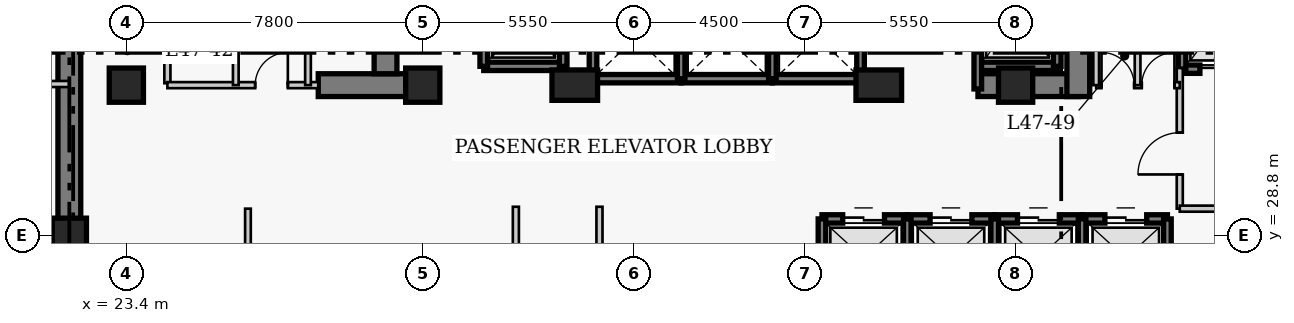
"""IFC4 building model, lengths in metres.
Left out: names, types, materials, properties, quantities, classifications, styles, units other than length and angle.
Written with IfcOpenShell. Run it as: python <this file> out.ifc"""

import sys

from ifc_helpers import new_model, si_unit, direction, frame, frame_2d, origin, origin_2d, place, context, subcontext, project, spatial, rectangle, extrude, element, fill, save


model = new_model("IFC4")
c1 = context("Model", 3, precision=1e-05, world=origin(), true_north=direction((0.0, 1.0)))
c2 = subcontext(c1, "Body", "Model", "MODEL_VIEW")
j1 = project(units=[si_unit("LENGTHUNIT", "METRE"), si_unit("PLANEANGLEUNIT", "RADIAN")], contexts=[c1])
p1 = place(None, origin())
s1 = spatial("IfcSite", under=j1, at=p1, CompositionType="ELEMENT")
p2 = place(p1, origin())
s2 = spatial("IfcBuilding", under=s1, at=p2, CompositionType="ELEMENT")
p3 = place(p2, frame((0.0, 0.0, 189.0)))
s3 = spatial("IfcBuildingStorey", under=s2, at=p3, CompositionType="ELEMENT", Elevation=189.0)
p4 = place(p3, frame((21.9, 27.05, 0.0), z_axis=(0.0, 0.0, 1.0), x_axis=(0.0, 1.0, 0.0)))
e1 = element("IfcWall", 1, at=p4, inside=s3, PredefinedType="SHEAR", context=c2, shape_type="SweptSolid", body=[
    extrude(rectangle(XDim=13.57, YDim=0.6, at=frame_2d((6.785, 0.0))), origin(), (0.0, 0.0, 1.0), 3.9),
])
p5 = place(p3, frame((28.45, 32.75, 0.0), z_axis=(0.0, 0.0, 1.0), x_axis=(1.0, 0.0, 0.0)))
e2 = element("IfcWall", 2, at=p5, inside=s3, PredefinedType="SHEAR", context=c2, shape_type="SweptSolid", body=[
    extrude(rectangle(XDim=2.4, YDim=0.6, at=frame_2d((1.2, 0.0))), origin(), (0.0, 0.0, 1.0), 3.9),
])
p6 = place(p3, frame((45.81, 32.75, 0.0), z_axis=(0.0, 0.0, 1.0), x_axis=(1.0, 0.0, 0.0)))
e3 = element("IfcWall", 3, at=p6, inside=s3, PredefinedType="SHEAR", context=c2, shape_type="SweptSolid", body=[
    extrude(rectangle(XDim=2.64, YDim=0.6, at=frame_2d((1.32, 0.0))), origin(), (0.0, 0.0, 1.0), 3.9),
])
p7 = place(p3, frame((30.22, 33.05, 0.0), z_axis=(0.0, 0.0, 1.0), x_axis=(0.0, 1.0, 0.0)))
e4 = element("IfcWall", 4, at=p7, inside=s3, PredefinedType="SHEAR", context=c2, shape_type="SweptSolid", body=[
    extrude(rectangle(XDim=7.27, YDim=0.6, at=frame_2d((3.635, 0.0))), origin(), (0.0, 0.0, 1.0), 3.9),
])
p8 = place(p3, frame((48.45, 32.45, 0.0), z_axis=(0.0, 0.0, 1.0), x_axis=(0.0, 1.0, 0.0)))
e5 = element("IfcWall", 5, at=p8, inside=s3, PredefinedType="SHEAR", context=c2, shape_type="SweptSolid", body=[
    extrude(rectangle(XDim=7.87, YDim=0.6, at=frame_2d((3.935, 0.0))), origin(), (0.0, 0.0, 1.0), 3.9),
])
p9 = place(p8, frame((5.75, 0.0, 0.0)))
e6 = element("IfcOpeningElement", 6, at=p9, cuts=e5, PredefinedType="OPENING", context=c2, shape_type="SweptSolid", body=[
    extrude(rectangle(XDim=1.1, YDim=2.15, at=frame_2d((0.55, 1.075))), frame((0.0, 0.31, 0.0), z_axis=(0.0, -1.0, 0.0), x_axis=(1.0, 0.0, 0.0)), (0.0, 0.0, 1.0), 0.62),
])
for number, where, z_axis, x_axis in (
    (7, (21.9, 28.8, 0.0), (0.0, 0.0, 1.0), (1.0, 0.0, 0.0)),
    (8, (23.4, 32.75, 0.0), (0.0, 0.0, 1.0), (1.0, 0.0, 0.0)),
    (9, (31.2, 32.75, 0.0), (0.0, 0.0, 1.0), (1.0, 0.0, 0.0)),
):
    element("IfcColumn", number, at=place(p3, frame(where, z_axis=z_axis, x_axis=x_axis)), inside=s3, PredefinedType="COLUMN", context=c2, shape_type="SweptSolid", body=[
        extrude(rectangle(XDim=0.9, YDim=0.9, at=origin_2d()), origin(), (0.0, 0.0, 1.0), 3.9),
    ])
for number, where, z_axis, x_axis in (
    (10, (35.2, 32.75, 0.0), (0.0, 0.0, 1.0), (1.0, 0.0, 0.0)),
    (11, (43.2, 32.75, 0.0), (0.0, 0.0, 1.0), (1.0, 0.0, 0.0)),
):
    element("IfcColumn", number, at=place(p3, frame(where, z_axis=z_axis, x_axis=x_axis)), inside=s3, PredefinedType="COLUMN", context=c2, shape_type="SweptSolid", body=[
        extrude(rectangle(XDim=1.2, YDim=0.8, at=origin_2d()), origin(), (0.0, 0.0, 1.0), 3.9),
    ])
p10 = place(p3, frame((46.8, 32.75, 0.0), z_axis=(0.0, 0.0, 1.0), x_axis=(1.0, 0.0, 0.0)))
e12 = element("IfcColumn", 12, at=p10, inside=s3, PredefinedType="COLUMN", context=c2, shape_type="SweptSolid", body=[
    extrude(rectangle(XDim=0.9, YDim=0.9, at=origin_2d()), origin(), (0.0, 0.0, 1.0), 3.9),
])
p11 = place(p3, frame((41.705, 29.23, 0.0), z_axis=(0.0, 0.0, 1.0), x_axis=(1.0, 0.0, 0.0)))
e13 = element("IfcWall", 13, at=p11, inside=s3, PredefinedType="SHEAR", context=c2, shape_type="SweptSolid", body=[
    extrude(rectangle(XDim=2.245, YDim=0.22, at=frame_2d((1.123, 0.0))), origin(), (0.0, 0.0, 1.0), 3.9),
])
p12 = place(p11, frame((0.545, 0.0, 0.0)))
e14 = element("IfcOpeningElement", 14, at=p12, cuts=e13, PredefinedType="OPENING", context=c2, shape_type="SweptSolid", body=[
    extrude(rectangle(XDim=1.1, YDim=2.15, at=frame_2d((0.55, 1.075))), frame((0.0, 0.12, 0.0), z_axis=(0.0, -1.0, 0.0), x_axis=(1.0, 0.0, 0.0)), (0.0, 0.0, 1.0), 0.24),
])
p13 = place(p3, frame((41.705, 27.17, 0.0), z_axis=(0.0, 0.0, 1.0), x_axis=(0.0, 1.0, 0.0)))
e15 = element("IfcWall", 15, at=p13, inside=s3, PredefinedType="SHEAR", context=c2, shape_type="SweptSolid", body=[
    extrude(rectangle(XDim=2.06, YDim=0.2, at=frame_2d((1.03, 0.0))), origin(), (0.0, 0.0, 1.0), 3.9),
])
p14 = place(p3, frame((43.95, 29.23, 0.0), z_axis=(0.0, 0.0, 1.0), x_axis=(1.0, 0.0, 0.0)))
e16 = element("IfcWall", 16, at=p14, inside=s3, PredefinedType="SHEAR", context=c2, shape_type="SweptSolid", body=[
    extrude(rectangle(XDim=2.3, YDim=0.22, at=frame_2d((1.15, 0.0))), origin(), (0.0, 0.0, 1.0), 3.9),
])
p15 = place(p14, frame((0.6, 0.0, 0.0)))
e17 = element("IfcOpeningElement", 17, at=p15, cuts=e16, PredefinedType="OPENING", context=c2, shape_type="SweptSolid", body=[
    extrude(rectangle(XDim=1.1, YDim=2.15, at=frame_2d((0.55, 1.075))), frame((0.0, 0.12, 0.0), z_axis=(0.0, -1.0, 0.0), x_axis=(1.0, 0.0, 0.0)), (0.0, 0.0, 1.0), 0.24),
])
p16 = place(p3, frame((43.95, 27.17, 0.0), z_axis=(0.0, 0.0, 1.0), x_axis=(0.0, 1.0, 0.0)))
e18 = element("IfcWall", 18, at=p16, inside=s3, PredefinedType="SHEAR", context=c2, shape_type="SweptSolid", body=[
    extrude(rectangle(XDim=2.06, YDim=0.2, at=frame_2d((1.03, 0.0))), origin(), (0.0, 0.0, 1.0), 3.9),
])
p17 = place(p3, frame((46.25, 29.23, 0.0), z_axis=(0.0, 0.0, 1.0), x_axis=(1.0, 0.0, 0.0)))
e19 = element("IfcWall", 19, at=p17, inside=s3, PredefinedType="SHEAR", context=c2, shape_type="SweptSolid", body=[
    extrude(rectangle(XDim=2.3, YDim=0.22, at=frame_2d((1.15, 0.0))), origin(), (0.0, 0.0, 1.0), 3.9),
])
p18 = place(p17, frame((0.6, 0.0, 0.0)))
e20 = element("IfcOpeningElement", 20, at=p18, cuts=e19, PredefinedType="OPENING", context=c2, shape_type="SweptSolid", body=[
    extrude(rectangle(XDim=1.1, YDim=2.15, at=frame_2d((0.55, 1.075))), frame((0.0, 0.12, 0.0), z_axis=(0.0, -1.0, 0.0), x_axis=(1.0, 0.0, 0.0)), (0.0, 0.0, 1.0), 0.24),
])
p19 = place(p3, frame((46.25, 27.17, 0.0), z_axis=(0.0, 0.0, 1.0), x_axis=(0.0, 1.0, 0.0)))
e21 = element("IfcWall", 21, at=p19, inside=s3, PredefinedType="SHEAR", context=c2, shape_type="SweptSolid", body=[
    extrude(rectangle(XDim=2.06, YDim=0.2, at=frame_2d((1.03, 0.0))), origin(), (0.0, 0.0, 1.0), 3.9),
])
p20 = place(p3, frame((48.55, 29.23, 0.0), z_axis=(0.0, 0.0, 1.0), x_axis=(1.0, 0.0, 0.0)))
e22 = element("IfcWall", 22, at=p20, inside=s3, PredefinedType="SHEAR", context=c2, shape_type="SweptSolid", body=[
    extrude(rectangle(XDim=2.245, YDim=0.22, at=frame_2d((1.123, 0.0))), origin(), (0.0, 0.0, 1.0), 3.9),
])
p21 = place(p20, frame((0.6, 0.0, 0.0)))
e23 = element("IfcOpeningElement", 23, at=p21, cuts=e22, PredefinedType="OPENING", context=c2, shape_type="SweptSolid", body=[
    extrude(rectangle(XDim=1.1, YDim=2.15, at=frame_2d((0.55, 1.075))), frame((0.0, 0.12, 0.0), z_axis=(0.0, -1.0, 0.0), x_axis=(1.0, 0.0, 0.0)), (0.0, 0.0, 1.0), 0.24),
])
for number, where, z_axis, x_axis in (
    (24, (48.55, 27.17, 0.0), (0.0, 0.0, 1.0), (0.0, 1.0, 0.0)),
    (25, (50.795, 27.17, 0.0), (0.0, 0.0, 1.0), (0.0, 1.0, 0.0)),
):
    element("IfcWall", number, at=place(p3, frame(where, z_axis=z_axis, x_axis=x_axis)), inside=s3, PredefinedType="SHEAR", context=c2, shape_type="SweptSolid", body=[
        extrude(rectangle(XDim=2.06, YDim=0.2, at=frame_2d((1.03, 0.0))), origin(), (0.0, 0.0, 1.0), 3.9),
    ])
p22 = place(p3, frame((35.68, 32.92, 0.0), z_axis=(0.0, 0.0, 1.0), x_axis=(1.0, 0.0, 0.0)))
e26 = element("IfcWall", 26, at=p22, inside=s3, PredefinedType="SHEAR", context=c2, shape_type="SweptSolid", body=[
    extrude(rectangle(XDim=2.32, YDim=0.22, at=frame_2d((1.16, 0.0))), origin(), (0.0, 0.0, 1.0), 3.9),
])
p23 = place(p3, frame((35.68, 32.92, 0.0), z_axis=(0.0, 0.0, 1.0), x_axis=(0.0, 1.0, 0.0)))
e27 = element("IfcWall", 27, at=p23, inside=s3, PredefinedType="SHEAR", context=c2, shape_type="SweptSolid", body=[
    extrude(rectangle(XDim=2.16, YDim=0.2, at=frame_2d((1.08, 0.0))), origin(), (0.0, 0.0, 1.0), 3.9),
])
p24 = place(p3, frame((38.0, 32.92, 0.0), z_axis=(0.0, 0.0, 1.0), x_axis=(1.0, 0.0, 0.0)))
e28 = element("IfcWall", 28, at=p24, inside=s3, PredefinedType="SHEAR", context=c2, shape_type="SweptSolid", body=[
    extrude(rectangle(XDim=2.4, YDim=0.22, at=frame_2d((1.2, 0.0))), origin(), (0.0, 0.0, 1.0), 3.9),
])
p25 = place(p3, frame((38.0, 32.92, 0.0), z_axis=(0.0, 0.0, 1.0), x_axis=(0.0, 1.0, 0.0)))
e29 = element("IfcWall", 29, at=p25, inside=s3, PredefinedType="SHEAR", context=c2, shape_type="SweptSolid", body=[
    extrude(rectangle(XDim=2.16, YDim=0.2, at=frame_2d((1.08, 0.0))), origin(), (0.0, 0.0, 1.0), 3.9),
])
p26 = place(p3, frame((40.4, 32.92, 0.0), z_axis=(0.0, 0.0, 1.0), x_axis=(1.0, 0.0, 0.0)))
e30 = element("IfcWall", 30, at=p26, inside=s3, PredefinedType="SHEAR", context=c2, shape_type="SweptSolid", body=[
    extrude(rectangle(XDim=2.32, YDim=0.22, at=frame_2d((1.16, 0.0))), origin(), (0.0, 0.0, 1.0), 3.9),
])
for number, where, z_axis, x_axis in (
    (31, (40.4, 32.92, 0.0), (0.0, 0.0, 1.0), (0.0, 1.0, 0.0)),
    (32, (42.72, 32.92, 0.0), (0.0, 0.0, 1.0), (0.0, 1.0, 0.0)),
):
    element("IfcWall", number, at=place(p3, frame(where, z_axis=z_axis, x_axis=x_axis)), inside=s3, PredefinedType="SHEAR", context=c2, shape_type="SweptSolid", body=[
        extrude(rectangle(XDim=2.16, YDim=0.2, at=frame_2d((1.08, 0.0))), origin(), (0.0, 0.0, 1.0), 3.9),
    ])
p27 = place(p3, frame((51.18, 33.17, 0.0), z_axis=(0.0, 0.0, 1.0), x_axis=(1.0, 0.0, 0.0)))
e33 = element("IfcWall", 33, at=p27, inside=s3, PredefinedType="SHEAR", context=c2, shape_type="SweptSolid", body=[
    extrude(rectangle(XDim=2.42, YDim=0.22, at=frame_2d((1.21, 0.0))), origin(), (0.0, 0.0, 1.0), 3.9),
])
p28 = place(p27, frame((0.47, 0.0, 0.0)))
e34 = element("IfcOpeningElement", 34, at=p28, cuts=e33, PredefinedType="OPENING", context=c2, shape_type="SweptSolid", body=[
    extrude(rectangle(XDim=1.3, YDim=2.15, at=frame_2d((0.65, 1.075))), frame((0.0, 0.12, 0.0), z_axis=(0.0, -1.0, 0.0), x_axis=(1.0, 0.0, 0.0)), (0.0, 0.0, 1.0), 0.24),
])
p29 = place(p3, frame((51.18, 33.17, 0.0), z_axis=(0.0, 0.0, 1.0), x_axis=(0.0, 1.0, 0.0)))
e35 = element("IfcWall", 35, at=p29, inside=s3, PredefinedType="SHEAR", context=c2, shape_type="SweptSolid", body=[
    extrude(rectangle(XDim=2.86, YDim=0.2, at=frame_2d((1.43, 0.0))), origin(), (0.0, 0.0, 1.0), 3.9),
])
p30 = place(p3, frame((32.805, 33.245, 0.0), z_axis=(0.0, 0.0, 1.0), x_axis=(1.0, 0.0, 0.0)))
e36 = element("IfcWall", 36, at=p30, inside=s3, PredefinedType="SHEAR", context=c2, shape_type="SweptSolid", body=[
    extrude(rectangle(XDim=2.09, YDim=0.22, at=frame_2d((1.045, 0.0))), origin(), (0.0, 0.0, 1.0), 3.9),
])
for number, where, z_axis, x_axis in (
    (37, (32.805, 33.245, 0.0), (0.0, 0.0, 1.0), (0.0, 1.0, 0.0)),
    (38, (34.895, 33.245, 0.0), (0.0, 0.0, 1.0), (0.0, 1.0, 0.0)),
):
    element("IfcWall", number, at=place(p3, frame(where, z_axis=z_axis, x_axis=x_axis)), inside=s3, PredefinedType="SHEAR", context=c2, shape_type="SweptSolid", body=[
        extrude(rectangle(XDim=2.91, YDim=0.2, at=frame_2d((1.455, 0.0))), origin(), (0.0, 0.0, 1.0), 3.9),
    ])
p31 = place(p3, frame((45.805, 33.245, 0.0), z_axis=(0.0, 0.0, 1.0), x_axis=(1.0, 0.0, 0.0)))
e39 = element("IfcWall", 39, at=p31, inside=s3, PredefinedType="SHEAR", context=c2, shape_type="SweptSolid", body=[
    extrude(rectangle(XDim=2.09, YDim=0.22, at=frame_2d((1.045, 0.0))), origin(), (0.0, 0.0, 1.0), 3.9),
])
p32 = place(p3, frame((45.805, 32.65, 0.0), z_axis=(0.0, 0.0, 1.0), x_axis=(0.0, 1.0, 0.0)))
e40 = element("IfcWall", 40, at=p32, inside=s3, PredefinedType="SHEAR", context=c2, shape_type="SweptSolid", body=[
    extrude(rectangle(XDim=3.505, YDim=0.2, at=frame_2d((1.752, 0.0))), origin(), (0.0, 0.0, 1.0), 3.9),
])
p33 = place(p3, frame((47.895, 33.245, 0.0), z_axis=(0.0, 0.0, 1.0), x_axis=(0.0, 1.0, 0.0)))
e41 = element("IfcWall", 41, at=p33, inside=s3, PredefinedType="SHEAR", context=c2, shape_type="SweptSolid", body=[
    extrude(rectangle(XDim=2.91, YDim=0.2, at=frame_2d((1.455, 0.0))), origin(), (0.0, 0.0, 1.0), 3.9),
])
p34 = place(p3, frame((24.48, 32.8, 0.0), z_axis=(0.0, 0.0, 1.0), x_axis=(0.0, 1.0, 0.0)))
e42 = element("IfcWall", 42, at=p34, inside=s3, PredefinedType="PARTITIONING", context=c2, shape_type="SweptSolid", body=[
    extrude(rectangle(XDim=3.57, YDim=0.16, at=frame_2d((1.785, 0.0))), origin(), (0.0, 0.0, 1.0), 3.65),
])
p35 = place(p34, frame((1.604, 0.0, 0.0)))
e43 = element("IfcOpeningElement", 43, at=p35, cuts=e42, PredefinedType="OPENING", context=c2, shape_type="SweptSolid", body=[
    extrude(rectangle(XDim=0.9, YDim=2.1, at=frame_2d((0.45, 1.05))), frame((0.0, 0.09, 0.0), z_axis=(0.0, -1.0, 0.0), x_axis=(1.0, 0.0, 0.0)), (0.0, 0.0, 1.0), 0.18),
])
p36 = place(p3, frame((51.12, 29.5, 0.0), z_axis=(0.0, 0.0, 1.0), x_axis=(0.0, 1.0, 0.0)))
e44 = element("IfcWall", 44, at=p36, inside=s3, PredefinedType="PARTITIONING", context=c2, shape_type="SweptSolid", body=[
    extrude(rectangle(XDim=3.7, YDim=0.16, at=frame_2d((1.85, 0.0))), origin(), (0.0, 0.0, 1.0), 3.65),
])
p37 = place(p36, frame((0.9, 0.0, 0.0)))
e45 = element("IfcOpeningElement", 45, at=p37, cuts=e44, PredefinedType="OPENING", context=c2, shape_type="SweptSolid", body=[
    extrude(rectangle(XDim=1.1, YDim=2.15, at=frame_2d((0.55, 1.075))), frame((0.0, 0.09, 0.0), z_axis=(0.0, -1.0, 0.0), x_axis=(1.0, 0.0, 0.0)), (0.0, 0.0, 1.0), 0.18),
])
p38 = place(p3, frame((51.12, 29.5, 0.0), z_axis=(0.0, 0.0, 1.0), x_axis=(1.0, 0.0, 0.0)))
e46 = element("IfcWall", 46, at=p38, inside=s3, PredefinedType="PARTITIONING", context=c2, shape_type="SweptSolid", body=[
    extrude(rectangle(XDim=5.63, YDim=0.16, at=frame_2d((2.815, 0.0))), origin(), (0.0, 0.0, 1.0), 3.65),
])
p39 = place(p3, frame((24.48, 32.75, 0.0), z_axis=(0.0, 0.0, 1.0), x_axis=(1.0, 0.0, 0.0)))
e47 = element("IfcWall", 47, at=p39, inside=s3, PredefinedType="PARTITIONING", context=c2, shape_type="SweptSolid", body=[
    extrude(rectangle(XDim=3.97, YDim=0.16, at=frame_2d((1.985, 0.0))), origin(), (0.0, 0.0, 1.0), 3.65),
])
p40 = place(p39, frame((2.31, 0.0, 0.0)))
e48 = element("IfcOpeningElement", 48, at=p40, cuts=e47, PredefinedType="OPENING", context=c2, shape_type="SweptSolid", body=[
    extrude(rectangle(XDim=0.86, YDim=2.05, at=frame_2d((0.43, 1.025))), frame((0.0, 0.09, 0.0), z_axis=(0.0, -1.0, 0.0), x_axis=(1.0, 0.0, 0.0)), (0.0, 0.0, 1.0), 0.18),
])
p41 = place(p3, frame((48.92, 32.75, 0.0), z_axis=(0.0, 0.0, 1.0), x_axis=(1.0, 0.0, 0.0)))
e49 = element("IfcWall", 49, at=p41, inside=s3, PredefinedType="PARTITIONING", context=c2, shape_type="SweptSolid", body=[
    extrude(rectangle(XDim=2.2, YDim=0.16, at=frame_2d((1.1, 0.0))), origin(), (0.0, 0.0, 1.0), 3.65),
])
p42 = place(p41, frame((0.14, 0.0, 0.0)))
e50 = element("IfcOpeningElement", 50, at=p42, cuts=e49, PredefinedType="OPENING", context=c2, shape_type="SweptSolid", body=[
    extrude(rectangle(XDim=0.86, YDim=2.05, at=frame_2d((0.43, 1.025))), frame((0.0, 0.09, 0.0), z_axis=(0.0, -1.0, 0.0), x_axis=(1.0, 0.0, 0.0)), (0.0, 0.0, 1.0), 0.18),
])
p43 = place(p41, frame((1.2, 0.0, 0.0)))
e51 = element("IfcOpeningElement", 51, at=p43, cuts=e49, PredefinedType="OPENING", context=c2, shape_type="SweptSolid", body=[
    extrude(rectangle(XDim=0.86, YDim=2.05, at=frame_2d((0.43, 1.025))), frame((0.0, 0.09, 0.0), z_axis=(0.0, -1.0, 0.0), x_axis=(1.0, 0.0, 0.0)), (0.0, 0.0, 1.0), 0.18),
])
for number, where, z_axis, x_axis in (
    (52, (48.92, 32.75, 0.0), (0.0, 0.0, 1.0), (0.0, 1.0, 0.0)),
    (53, (26.28, 32.75, 0.0), (0.0, 0.0, 1.0), (0.0, 1.0, 0.0)),
    (54, (28.18, 32.75, 0.0), (0.0, 0.0, 1.0), (0.0, 1.0, 0.0)),
    (55, (50.01, 32.75, 0.0), (0.0, 0.0, 1.0), (0.0, 1.0, 0.0)),
):
    element("IfcWall", number, at=place(p3, frame(where, z_axis=z_axis, x_axis=x_axis)), inside=s3, PredefinedType="PARTITIONING", context=c2, shape_type="SweptSolid", body=[
        extrude(rectangle(XDim=3.62, YDim=0.15, at=frame_2d((1.81, 0.0))), origin(), (0.0, 0.0, 1.0), 3.65),
    ])
for number, where, z_axis, x_axis in (
    (56, (33.65, 17.26, 0.0), (0.0, 0.0, 1.0), (0.0, 1.0, 0.0)),
    (57, (35.85, 17.26, 0.0), (0.0, 0.0, 1.0), (0.0, 1.0, 0.0)),
):
    element("IfcWall", number, at=place(p3, frame(where, z_axis=z_axis, x_axis=x_axis)), inside=s3, PredefinedType="PARTITIONING", context=c2, shape_type="SweptSolid", body=[
        extrude(rectangle(XDim=12.29, YDim=0.16, at=frame_2d((6.145, 0.0))), origin(), (0.0, 0.0, 1.0), 3.65),
    ])
p44 = place(p3, frame((20.46, 32.78, 0.0), z_axis=(0.0, 0.0, 1.0), x_axis=(1.0, 0.0, 0.0)))
e58 = element("IfcWall", 58, at=p44, inside=s3, PredefinedType="PARTITIONING", context=c2, shape_type="SweptSolid", body=[
    extrude(rectangle(XDim=1.44, YDim=0.16, at=frame_2d((0.72, 0.0))), origin(), (0.0, 0.0, 1.0), 3.65),
])
p45 = place(p3, frame((26.6, 17.26, 0.0), z_axis=(0.0, 0.0, 1.0), x_axis=(0.0, 1.0, 0.0)))
e59 = element("IfcWall", 59, at=p45, inside=s3, PredefinedType="PARTITIONING", context=c2, shape_type="SweptSolid", body=[
    extrude(rectangle(XDim=12.24, YDim=0.15, at=frame_2d((6.12, 0.0))), origin(), (0.0, 0.0, 1.0), 3.65),
])
p46 = place(p12, origin())
e60 = element("IfcDoor", 60, at=p46, inside=s3, OperationType="DOUBLE_DOOR_SLIDING", PredefinedType="DOOR", context=c2, shape_type="SweptSolid", body=[
    extrude(rectangle(XDim=1.1, YDim=2.15, at=frame_2d((0.55, 1.075))), frame((0.0, 0.025, 0.0), z_axis=(0.0, -1.0, 0.0), x_axis=(1.0, 0.0, 0.0)), (0.0, 0.0, 1.0), 0.05),
])
fill(e14, e60)
p47 = place(p15, origin())
e61 = element("IfcDoor", 61, at=p47, inside=s3, OperationType="DOUBLE_DOOR_SLIDING", PredefinedType="DOOR", context=c2, shape_type="SweptSolid", body=[
    extrude(rectangle(XDim=1.1, YDim=2.15, at=frame_2d((0.55, 1.075))), frame((0.0, 0.025, 0.0), z_axis=(0.0, -1.0, 0.0), x_axis=(1.0, 0.0, 0.0)), (0.0, 0.0, 1.0), 0.05),
])
fill(e17, e61)
p48 = place(p18, origin())
e62 = element("IfcDoor", 62, at=p48, inside=s3, OperationType="DOUBLE_DOOR_SLIDING", PredefinedType="DOOR", context=c2, shape_type="SweptSolid", body=[
    extrude(rectangle(XDim=1.1, YDim=2.15, at=frame_2d((0.55, 1.075))), frame((0.0, 0.025, 0.0), z_axis=(0.0, -1.0, 0.0), x_axis=(1.0, 0.0, 0.0)), (0.0, 0.0, 1.0), 0.05),
])
fill(e20, e62)
p49 = place(p21, origin())
e63 = element("IfcDoor", 63, at=p49, inside=s3, OperationType="DOUBLE_DOOR_SLIDING", PredefinedType="DOOR", context=c2, shape_type="SweptSolid", body=[
    extrude(rectangle(XDim=1.1, YDim=2.15, at=frame_2d((0.55, 1.075))), frame((0.0, 0.025, 0.0), z_axis=(0.0, -1.0, 0.0), x_axis=(1.0, 0.0, 0.0)), (0.0, 0.0, 1.0), 0.05),
])
fill(e23, e63)
p50 = place(p28, origin())
e64 = element("IfcDoor", 64, at=p50, inside=s3, OperationType="DOUBLE_DOOR_SLIDING", PredefinedType="DOOR", context=c2, shape_type="SweptSolid", body=[
    extrude(rectangle(XDim=1.3, YDim=2.15, at=frame_2d((0.65, 1.075))), frame((0.0, 0.025, 0.0), z_axis=(0.0, -1.0, 0.0), x_axis=(1.0, 0.0, 0.0)), (0.0, 0.0, 1.0), 0.05),
])
fill(e34, e64)
p51 = place(p37, origin())
e65 = element("IfcDoor", 65, at=p51, inside=s3, OperationType="SINGLE_SWING_LEFT", PredefinedType="DOOR", context=c2, shape_type="SweptSolid", body=[
    extrude(rectangle(XDim=1.1, YDim=2.15, at=frame_2d((0.55, 1.075))), frame((0.0, 0.025, 0.0), z_axis=(0.0, -1.0, 0.0), x_axis=(1.0, 0.0, 0.0)), (0.0, 0.0, 1.0), 0.05),
])
fill(e45, e65)
p52 = place(p40, origin())
e66 = element("IfcDoor", 66, at=p52, inside=s3, OperationType="SINGLE_SWING_RIGHT", PredefinedType="DOOR", context=c2, shape_type="SweptSolid", body=[
    extrude(rectangle(XDim=0.86, YDim=2.05, at=frame_2d((0.43, 1.025))), frame((0.0, 0.025, 0.0), z_axis=(0.0, -1.0, 0.0), x_axis=(1.0, 0.0, 0.0)), (0.0, 0.0, 1.0), 0.05),
])
fill(e48, e66)
p53 = place(p42, origin())
e67 = element("IfcDoor", 67, at=p53, inside=s3, OperationType="SINGLE_SWING_LEFT", PredefinedType="DOOR", context=c2, shape_type="SweptSolid", body=[
    extrude(rectangle(XDim=0.86, YDim=2.05, at=frame_2d((0.43, 1.025))), frame((0.0, 0.025, 0.0), z_axis=(0.0, -1.0, 0.0), x_axis=(1.0, 0.0, 0.0)), (0.0, 0.0, 1.0), 0.05),
])
fill(e50, e67)
p54 = place(p43, origin())
e68 = element("IfcDoor", 68, at=p54, inside=s3, OperationType="SINGLE_SWING_RIGHT", PredefinedType="DOOR", context=c2, shape_type="SweptSolid", body=[
    extrude(rectangle(XDim=0.86, YDim=2.05, at=frame_2d((0.43, 1.025))), frame((0.0, 0.025, 0.0), z_axis=(0.0, -1.0, 0.0), x_axis=(1.0, 0.0, 0.0)), (0.0, 0.0, 1.0), 0.05),
])
fill(e51, e68)
save(model, sys.argv[1])
